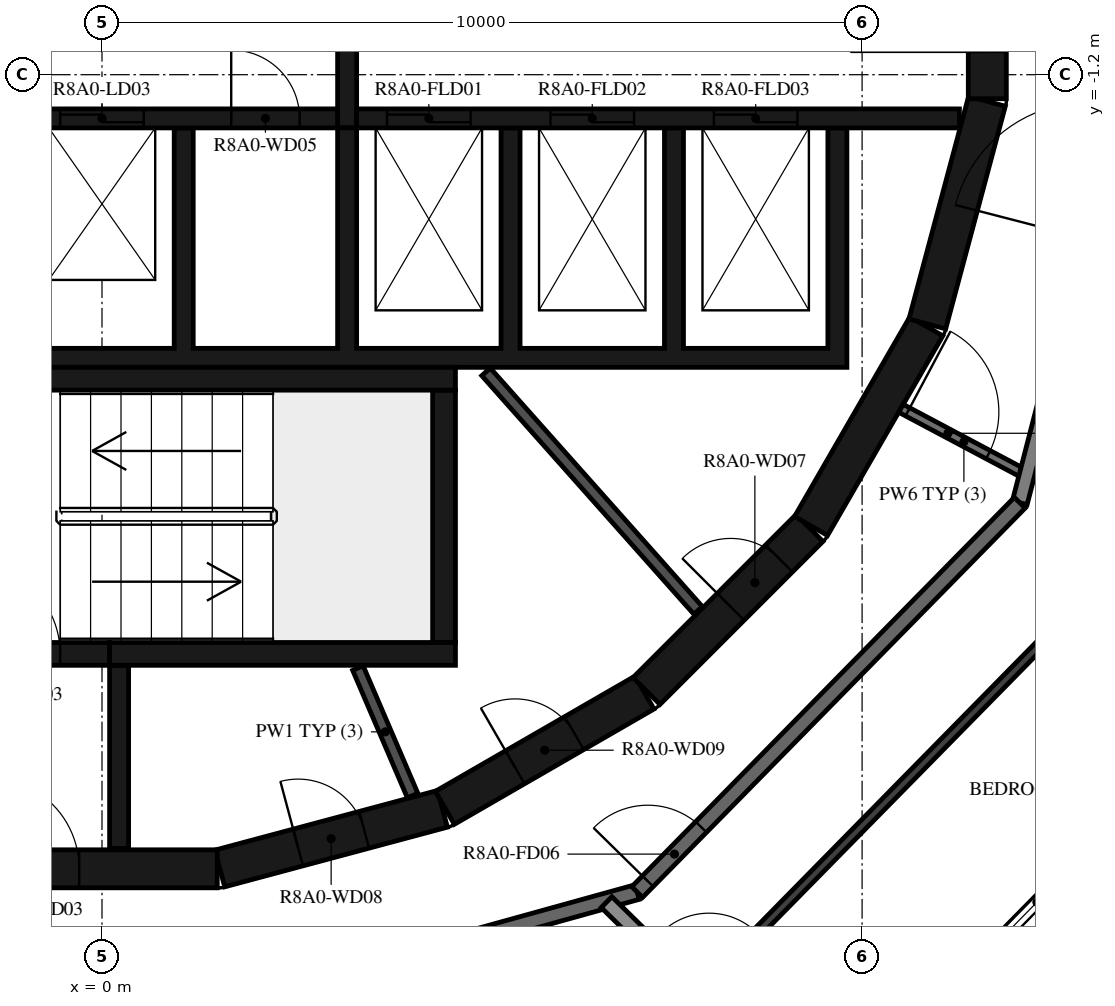
"""IFC4 building model, lengths in metres.
Left out: names, types, materials, properties, quantities, classifications, styles, units other than length and angle.
Written with IfcOpenShell. Run it as: python <this file> out.ifc"""

import sys

from ifc_helpers import new_model, si_unit, direction, frame, frame_2d, origin, place, context, subcontext, project, spatial, polyline, rectangle, outline, extrude, element, fill, save


model = new_model("IFC4")
c1 = context("Model", 3, precision=1e-05, world=origin(), true_north=direction((0.0, 1.0)))
c2 = subcontext(c1, "Body", "Model", "MODEL_VIEW")
j1 = project(units=[si_unit("LENGTHUNIT", "METRE"), si_unit("PLANEANGLEUNIT", "RADIAN")], contexts=[c1])
p1 = place(None, origin())
s1 = spatial("IfcSite", under=j1, at=p1, CompositionType="ELEMENT")
p2 = place(p1, origin())
s2 = spatial("IfcBuilding", under=s1, at=p2, CompositionType="ELEMENT")
p3 = place(p2, frame((0.0, 0.0, 305.2)))
s3 = spatial("IfcBuildingStorey", under=s2, at=p3, CompositionType="ELEMENT", Elevation=305.2)
p4 = place(p3, frame((1.55, -11.643, 0.0), z_axis=(0.0, 0.0, 1.0), x_axis=(0.965948410781, 0.258734743916, 0.0)))
e1 = element("IfcWall", 1, at=p4, inside=s3, PredefinedType="SHEAR", context=c2, shape_type="SweptSolid", body=[
    extrude(rectangle(XDim=3.033, YDim=0.5, at=frame_2d((1.516, 0.0))), origin(), (0.0, 0.0, 1.0), 3.12),
])
p5 = place(p4, frame((1.066, 0.0, 0.0)))
e2 = element("IfcOpeningElement", 2, at=p5, cuts=e1, PredefinedType="OPENING", context=c2, shape_type="SweptSolid", body=[
    extrude(rectangle(XDim=0.9, YDim=2.1, at=frame_2d((0.45, 1.05))), frame((0.0, 0.26, 0.0), z_axis=(0.0, -1.0, 0.0), x_axis=(1.0, 0.0, 0.0)), (0.0, 0.0, 1.0), 0.52),
])
p6 = place(p3, frame((4.51, -10.845, 0.0), z_axis=(0.0, 0.0, 1.0), x_axis=(0.865975092491, 0.500087131594, 0.0)))
e3 = element("IfcWall", 3, at=p6, inside=s3, PredefinedType="SHEAR", context=c2, shape_type="SweptSolid", body=[
    extrude(rectangle(XDim=3.033, YDim=0.5, at=frame_2d((1.516, 0.0))), origin(), (0.0, 0.0, 1.0), 3.12),
])
p7 = place(p6, frame((1.066, 0.0, 0.0)))
e4 = element("IfcOpeningElement", 4, at=p7, cuts=e3, PredefinedType="OPENING", context=c2, shape_type="SweptSolid", body=[
    extrude(rectangle(XDim=0.9, YDim=2.1, at=frame_2d((0.45, 1.05))), frame((0.0, 0.26, 0.0), z_axis=(0.0, -1.0, 0.0), x_axis=(1.0, 0.0, 0.0)), (0.0, 0.0, 1.0), 0.52),
])
p8 = place(p3, frame((7.164, -9.308, 0.0), z_axis=(0.0, 0.0, 1.0), x_axis=(0.707106781187, 0.707106781187, 0.0)))
e5 = element("IfcWall", 5, at=p8, inside=s3, PredefinedType="SHEAR", context=c2, shape_type="SweptSolid", body=[
    extrude(rectangle(XDim=3.032, YDim=0.5, at=frame_2d((1.516, 0.0))), origin(), (0.0, 0.0, 1.0), 3.12),
])
p9 = place(p8, frame((1.566, 0.0, 0.0)))
e6 = element("IfcOpeningElement", 6, at=p9, cuts=e5, PredefinedType="OPENING", context=c2, shape_type="SweptSolid", body=[
    extrude(rectangle(XDim=0.9, YDim=2.1, at=frame_2d((0.45, 1.05))), frame((0.0, 0.26, 0.0), z_axis=(0.0, -1.0, 0.0), x_axis=(1.0, 0.0, 0.0)), (0.0, 0.0, 1.0), 0.52),
])
for number, where, z_axis, x_axis in (
    (7, (9.329, -7.137, 0.0), (0.0, 0.0, 1.0), (0.5, 0.866, 0.0)),
    (8, (10.858, -4.479, 0.0), (0.0, 0.0, 1.0), (0.259, 0.966, 0.0)),
):
    element("IfcWall", number, at=place(p3, frame(where, z_axis=z_axis, x_axis=x_axis)), inside=s3, PredefinedType="SHEAR", context=c2, shape_type="SweptSolid", body=[
        extrude(rectangle(XDim=3.033, YDim=0.5, at=frame_2d((1.516, 0.0))), origin(), (0.0, 0.0, 1.0), 3.12),
    ])
p10 = place(p3, frame((11.647, -1.516, 0.0), z_axis=(0.0, 0.0, 1.0), x_axis=(0.0, 1.0, 0.0)))
e9 = element("IfcWall", 9, at=p10, inside=s3, PredefinedType="SHEAR", context=c2, shape_type="SweptSolid", body=[
    extrude(rectangle(XDim=3.033, YDim=0.5, at=frame_2d((1.516, 0.0))), origin(), (0.0, 0.0, 1.0), 3.12),
])
p11 = place(p10, frame((0.616, 0.0, 0.0)))
e10 = element("IfcOpeningElement", 10, at=p11, cuts=e9, PredefinedType="OPENING", context=c2, shape_type="SweptSolid", body=[
    extrude(rectangle(XDim=1.8, YDim=2.1, at=frame_2d((0.9, 1.05))), frame((0.0, 0.26, 0.0), z_axis=(0.0, -1.0, 0.0), x_axis=(1.0, 0.0, 0.0)), (0.0, 0.0, 1.0), 0.52),
])
p12 = place(p3, frame((-1.516, -11.647, 0.0), z_axis=(0.0, 0.0, 1.0), x_axis=(1.0, 0.0, 0.0)))
e11 = element("IfcWall", 11, at=p12, inside=s3, PredefinedType="SHEAR", context=c2, shape_type="SweptSolid", body=[
    extrude(rectangle(XDim=3.033, YDim=0.5, at=frame_2d((1.516, 0.0))), origin(), (0.0, 0.0, 1.0), 3.12),
])
p13 = place(p12, frame((0.016, 0.0, 0.0)))
e12 = element("IfcOpeningElement", 12, at=p13, cuts=e11, PredefinedType="OPENING", context=c2, shape_type="SweptSolid", body=[
    extrude(rectangle(XDim=1.2, YDim=2.1, at=frame_2d((0.6, 1.05))), frame((0.0, 0.26, 0.0), z_axis=(0.0, -1.0, 0.0), x_axis=(1.0, 0.0, 0.0)), (0.0, 0.0, 1.0), 0.52),
])
p14 = place(p3, frame((-2.4, -5.2, 0.0), z_axis=(0.0, 0.0, 1.0), x_axis=(1.0, 0.0, 0.0)))
e13 = element("IfcWall", 13, at=p14, inside=s3, PredefinedType="SHEAR", context=c2, shape_type="SweptSolid", body=[
    extrude(rectangle(XDim=7.05, YDim=0.3, at=frame_2d((3.525, 0.0))), origin(), (0.0, 0.0, 1.0), 3.12),
])
p15 = place(p3, frame((4.5, -8.67, 0.0), z_axis=(0.0, 0.0, 1.0), x_axis=(0.0, 1.0, 0.0)))
e14 = element("IfcWall", 14, at=p15, inside=s3, PredefinedType="SHEAR", context=c2, shape_type="SweptSolid", body=[
    extrude(rectangle(XDim=3.32, YDim=0.3, at=frame_2d((1.66, 0.0))), origin(), (0.0, 0.0, 1.0), 3.12),
])
p16 = place(p3, frame((0.1, -8.82, 0.0), z_axis=(0.0, 0.0, 1.0), x_axis=(1.0, 0.0, 0.0)))
e15 = element("IfcWall", 15, at=p16, inside=s3, PredefinedType="SHEAR", context=c2, shape_type="SweptSolid", body=[
    extrude(rectangle(XDim=4.55, YDim=0.3, at=frame_2d((2.275, 0.0))), origin(), (0.0, 0.0, 1.0), 3.12),
])
p17 = place(p3, frame((-2.4, -8.82, 0.0), z_axis=(0.0, 0.0, 1.0), x_axis=(1.0, 0.0, 0.0)))
e16 = element("IfcWall", 16, at=p17, inside=s3, PredefinedType="SHEAR", context=c2, shape_type="SweptSolid", body=[
    extrude(rectangle(XDim=2.5, YDim=0.3, at=frame_2d((1.25, 0.0))), origin(), (0.0, 0.0, 1.0), 3.12),
])
p18 = place(p17, frame((0.65, 0.0, 0.0)))
e17 = element("IfcOpeningElement", 17, at=p18, cuts=e16, PredefinedType="OPENING", context=c2, shape_type="SweptSolid", body=[
    extrude(rectangle(XDim=1.2, YDim=2.1, at=frame_2d((0.6, 1.05))), frame((0.0, 0.16, 0.0), z_axis=(0.0, -1.0, 0.0), x_axis=(1.0, 0.0, 0.0)), (0.0, 0.0, 1.0), 0.32),
])
p19 = place(p3, frame((0.225, -8.97, 0.0), z_axis=(0.0, 0.0, 1.0), x_axis=(0.0, -1.0, 0.0)))
e18 = element("IfcWall", 18, at=p19, inside=s3, PredefinedType="SHEAR", context=c2, shape_type="SweptSolid", body=[
    extrude(rectangle(XDim=2.41, YDim=0.25, at=frame_2d((1.205, 0.0))), origin(), (0.0, 0.0, 1.0), 3.12),
])
p20 = place(p3, origin())
e19 = element("IfcWall", 19, at=p20, inside=s3, PredefinedType="SHEAR", context=c2, shape_type="SweptSolid", body=[
    extrude(outline(polyline([(9.8, -5.05), (9.8, -4.8), (9.8, -1.9), (9.55, -1.9), (9.55, -4.8), (7.65, -4.8), (7.65, -1.9), (7.4, -1.9), (7.4, -4.8), (5.5, -4.8), (5.5, -1.9), (5.25, -1.9), (5.25, -4.8), (3.35, -4.8), (3.35, -1.9), (3.1, -1.9), (3.1, -4.8), (1.2, -4.8), (1.2, -1.9), (0.95, -1.9), (0.95, -4.8), (-0.95, -4.8), (-0.95, -1.9), (-1.2, -1.9), (-1.2, -4.8), (-3.1, -4.8), (-3.1, -1.9), (-3.35, -1.9), (-3.35, -4.8), (-5.25, -4.8), (-5.25, -1.9), (-5.5, -1.9), (-5.5, -4.8), (-9.55, -4.8), (-9.55, -1.9), (-9.8, -1.9), (-9.8, -4.8), (-9.8, -5.05), (9.8, -5.05)])), origin(), (0.0, 0.0, 1.0), 3.12),
])
p21 = place(p3, frame((-11.28, -1.775, 0.0), z_axis=(0.0, 0.0, 1.0), x_axis=(1.0, 0.0, 0.0)))
e20 = element("IfcWall", 20, at=p21, inside=s3, PredefinedType="SHEAR", context=c2, shape_type="SweptSolid", body=[
    extrude(rectangle(XDim=14.38, YDim=0.25, at=frame_2d((7.19, 0.0))), origin(), (0.0, 0.0, 1.0), 3.12),
])
p22 = place(p21, frame((6.43, 0.0, 0.0)))
e21 = element("IfcOpeningElement", 21, at=p22, cuts=e20, PredefinedType="OPENING", context=c2, shape_type="SweptSolid", body=[
    extrude(rectangle(XDim=1.1, YDim=2.1, at=frame_2d((0.55, 1.05))), frame((0.0, 0.135, 0.0), z_axis=(0.0, -1.0, 0.0), x_axis=(1.0, 0.0, 0.0)), (0.0, 0.0, 1.0), 0.27),
])
p23 = place(p21, frame((8.58, 0.0, 0.0)))
e22 = element("IfcOpeningElement", 22, at=p23, cuts=e20, PredefinedType="OPENING", context=c2, shape_type="SweptSolid", body=[
    extrude(rectangle(XDim=1.1, YDim=2.1, at=frame_2d((0.55, 1.05))), frame((0.0, 0.135, 0.0), z_axis=(0.0, -1.0, 0.0), x_axis=(1.0, 0.0, 0.0)), (0.0, 0.0, 1.0), 0.27),
])
p24 = place(p21, frame((10.73, 0.0, 0.0)))
e23 = element("IfcOpeningElement", 23, at=p24, cuts=e20, PredefinedType="OPENING", context=c2, shape_type="SweptSolid", body=[
    extrude(rectangle(XDim=1.1, YDim=2.1, at=frame_2d((0.55, 1.05))), frame((0.0, 0.135, 0.0), z_axis=(0.0, -1.0, 0.0), x_axis=(1.0, 0.0, 0.0)), (0.0, 0.0, 1.0), 0.27),
])
p25 = place(p21, frame((3.305, 0.0, 0.0)))
e24 = element("IfcOpeningElement", 24, at=p25, cuts=e20, PredefinedType="OPENING", context=c2, shape_type="SweptSolid", body=[
    extrude(rectangle(XDim=0.9, YDim=2.1, at=frame_2d((0.45, 1.05))), frame((0.0, 0.135, 0.0), z_axis=(0.0, -1.0, 0.0), x_axis=(1.0, 0.0, 0.0)), (0.0, 0.0, 1.0), 0.27),
])
p26 = place(p21, frame((12.98, 0.0, 0.0)))
e25 = element("IfcOpeningElement", 25, at=p26, cuts=e20, PredefinedType="OPENING", context=c2, shape_type="SweptSolid", body=[
    extrude(rectangle(XDim=0.9, YDim=2.1, at=frame_2d((0.45, 1.05))), frame((0.0, 0.135, 0.0), z_axis=(0.0, -1.0, 0.0), x_axis=(1.0, 0.0, 0.0)), (0.0, 0.0, 1.0), 0.27),
])
p27 = place(p3, frame((3.35, -1.775, 0.0), z_axis=(0.0, 0.0, 1.0), x_axis=(1.0, 0.0, 0.0)))
e26 = element("IfcWall", 26, at=p27, inside=s3, PredefinedType="SHEAR", context=c2, shape_type="SweptSolid", body=[
    extrude(rectangle(XDim=7.93, YDim=0.25, at=frame_2d((3.965, 0.0))), origin(), (0.0, 0.0, 1.0), 3.12),
])
p28 = place(p27, frame((0.4, 0.0, 0.0)))
e27 = element("IfcOpeningElement", 27, at=p28, cuts=e26, PredefinedType="OPENING", context=c2, shape_type="SweptSolid", body=[
    extrude(rectangle(XDim=1.1, YDim=2.4, at=frame_2d((0.55, 1.2))), frame((0.0, 0.135, 0.0), z_axis=(0.0, -1.0, 0.0), x_axis=(1.0, 0.0, 0.0)), (0.0, 0.0, 1.0), 0.27),
])
p29 = place(p27, frame((2.55, 0.0, 0.0)))
e28 = element("IfcOpeningElement", 28, at=p29, cuts=e26, PredefinedType="OPENING", context=c2, shape_type="SweptSolid", body=[
    extrude(rectangle(XDim=1.1, YDim=2.4, at=frame_2d((0.55, 1.2))), frame((0.0, 0.135, 0.0), z_axis=(0.0, -1.0, 0.0), x_axis=(1.0, 0.0, 0.0)), (0.0, 0.0, 1.0), 0.27),
])
p30 = place(p27, frame((4.7, 0.0, 0.0)))
e29 = element("IfcOpeningElement", 29, at=p30, cuts=e26, PredefinedType="OPENING", context=c2, shape_type="SweptSolid", body=[
    extrude(rectangle(XDim=1.1, YDim=2.4, at=frame_2d((0.55, 1.2))), frame((0.0, 0.135, 0.0), z_axis=(0.0, -1.0, 0.0), x_axis=(1.0, 0.0, 0.0)), (0.0, 0.0, 1.0), 0.27),
])
p31 = place(p3, frame((3.225, -1.9, 0.0), z_axis=(0.0, 0.0, 1.0), x_axis=(0.0, 1.0, 0.0)))
e30 = element("IfcWall", 30, at=p31, inside=s3, PredefinedType="SHEAR", context=c2, shape_type="SweptSolid", body=[
    extrude(rectangle(XDim=3.8, YDim=0.25, at=frame_2d((1.9, 0.0))), origin(), (0.0, 0.0, 1.0), 3.12),
])
p32 = place(p3, frame((7.842, -8.248, 0.0), z_axis=(0.0, 0.0, 1.0), x_axis=(-0.66446128181, 0.747322691329, 0.0)))
e31 = element("IfcWall", 31, at=p32, inside=s3, PredefinedType="PARTITIONING", context=c2, shape_type="SweptSolid", body=[
    extrude(rectangle(XDim=4.198, YDim=0.15, at=frame_2d((2.099, 0.0))), origin(), (0.0, 0.0, 1.0), 3.12),
])
p33 = place(p3, frame((3.367, -9.007, 0.0), z_axis=(0.0, 0.0, 1.0), x_axis=(0.394387482265, -0.918944238696, 0.0)))
e32 = element("IfcWall", 32, at=p33, inside=s3, PredefinedType="PARTITIONING", context=c2, shape_type="SweptSolid", body=[
    extrude(rectangle(XDim=1.825, YDim=0.15, at=frame_2d((0.913, 0.0))), origin(), (0.0, 0.0, 1.0), 3.12),
])
p34 = place(p3, frame((10.511, -5.589, 0.0), z_axis=(0.0, 0.0, 1.0), x_axis=(0.882957311919, -0.469453283437, 0.0)))
e33 = element("IfcWall", 33, at=p34, inside=s3, PredefinedType="PARTITIONING", context=c2, shape_type="SweptSolid", body=[
    extrude(rectangle(XDim=1.876, YDim=0.12, at=frame_2d((0.938, 0.0))), origin(), (0.0, 0.0, 1.0), 3.12),
])
p35 = place(p34, frame((0.1, 0.0, 0.0)))
e34 = element("IfcOpeningElement", 34, at=p35, cuts=e33, PredefinedType="OPENING", context=c2, shape_type="SweptSolid", body=[
    extrude(rectangle(XDim=1.2, YDim=2.1, at=frame_2d((0.6, 1.05))), frame((0.0, 0.07, 0.0), z_axis=(0.0, -1.0, 0.0), x_axis=(1.0, 0.0, 0.0)), (0.0, 0.0, 1.0), 0.14),
])
p36 = place(p3, frame((12.074, -6.831, 0.0), z_axis=(0.0, 0.0, 1.0), x_axis=(0.250391063186, 0.968144780225, 0.0)))
e35 = element("IfcWall", 35, at=p36, inside=s3, PredefinedType="STANDARD", context=c2, shape_type="SweptSolid", body=[
    extrude(rectangle(XDim=7.181, YDim=0.2, at=frame_2d((3.591, 0.0))), origin(), (0.0, 0.0, 1.0), 3.12),
])
p37 = place(p36, frame((3.581, 0.0, 0.0)))
e36 = element("IfcOpeningElement", 36, at=p37, cuts=e35, PredefinedType="OPENING", context=c2, shape_type="SweptSolid", body=[
    extrude(rectangle(XDim=1.8, YDim=2.1, at=frame_2d((0.9, 1.05))), frame((0.0, 0.11, 0.0), z_axis=(0.0, -1.0, 0.0), x_axis=(1.0, 0.0, 0.0)), (0.0, 0.0, 1.0), 0.22),
])
p38 = place(p3, frame((-6.831, -12.074, 0.0), z_axis=(0.0, 0.0, 1.0), x_axis=(0.968144780225, -0.250391063186, 0.0)))
e37 = element("IfcWall", 37, at=p38, inside=s3, PredefinedType="STANDARD", context=c2, shape_type="SweptSolid", body=[
    extrude(rectangle(XDim=7.181, YDim=0.2, at=frame_2d((3.591, 0.0))), origin(), (0.0, 0.0, 1.0), 3.12),
])
p39 = place(p38, frame((2.39, 0.0, 0.0)))
e38 = element("IfcOpeningElement", 38, at=p39, cuts=e37, PredefinedType="OPENING", context=c2, shape_type="SweptSolid", body=[
    extrude(rectangle(XDim=1.0, YDim=2.1, at=frame_2d((0.5, 1.05))), frame((0.0, 0.11, 0.0), z_axis=(0.0, -1.0, 0.0), x_axis=(1.0, 0.0, 0.0)), (0.0, 0.0, 1.0), 0.22),
])
p40 = place(p38, frame((5.69, 0.0, 0.0)))
e39 = element("IfcOpeningElement", 39, at=p40, cuts=e37, PredefinedType="OPENING", context=c2, shape_type="SweptSolid", body=[
    extrude(rectangle(XDim=1.0, YDim=2.1, at=frame_2d((0.5, 1.05))), frame((0.0, 0.11, 0.0), z_axis=(0.0, -1.0, 0.0), x_axis=(1.0, 0.0, 0.0)), (0.0, 0.0, 1.0), 0.22),
])
p41 = place(p3, frame((0.121, -13.872, 0.0), z_axis=(0.0, 0.0, 1.0), x_axis=(0.963625960674, 0.267254575108, 0.0)))
e40 = element("IfcWall", 40, at=p41, inside=s3, PredefinedType="STANDARD", context=c2, shape_type="SweptSolid", body=[
    extrude(rectangle(XDim=7.181, YDim=0.2, at=frame_2d((3.591, 0.0))), origin(), (0.0, 0.0, 1.0), 3.12),
])
p42 = place(p3, frame((7.041, -11.953, 0.0), z_axis=(0.0, 0.0, 1.0), x_axis=(0.70090916255, 0.713250549143, 0.0)))
e41 = element("IfcWall", 41, at=p42, inside=s3, PredefinedType="STANDARD", context=c2, shape_type="SweptSolid", body=[
    extrude(rectangle(XDim=7.181, YDim=0.2, at=frame_2d((3.59, 0.0))), origin(), (0.0, 0.0, 1.0), 3.12),
])
p43 = place(p42, frame((0.2, 0.0, 0.0)))
e42 = element("IfcOpeningElement", 42, at=p43, cuts=e41, PredefinedType="OPENING", context=c2, shape_type="SweptSolid", body=[
    extrude(rectangle(XDim=1.0, YDim=2.1, at=frame_2d((0.5, 1.05))), frame((0.0, 0.11, 0.0), z_axis=(0.0, -1.0, 0.0), x_axis=(1.0, 0.0, 0.0)), (0.0, 0.0, 1.0), 0.22),
])
p44 = place(p3, frame((9.462, -14.861, 0.0), z_axis=(0.0, 0.0, 1.0), x_axis=(-0.713276937124, 0.700882308927, 0.0)))
e43 = element("IfcWall", 43, at=p44, inside=s3, PredefinedType="STANDARD", context=c2, shape_type="SweptSolid", body=[
    extrude(rectangle(XDim=3.959, YDim=0.2, at=frame_2d((1.979, 0.0))), origin(), (0.0, 0.0, 1.0), 2.73),
])
p45 = place(p3, frame((7.846, -13.273, 0.0), z_axis=(0.0, 0.0, 1.0), x_axis=(0.700911018066, 0.713248725728, 0.0)))
e44 = element("IfcWall", 44, at=p45, inside=s3, PredefinedType="PARTITIONING", context=c2, shape_type="SweptSolid", body=[
    extrude(rectangle(XDim=7.935, YDim=0.12, at=frame_2d((3.968, 0.0))), origin(), (0.0, 0.0, 1.0), 3.12),
])
p46 = place(p45, frame((0.2, 0.0, 0.0)))
e45 = element("IfcOpeningElement", 45, at=p46, cuts=e44, PredefinedType="OPENING", context=c2, shape_type="SweptSolid", body=[
    extrude(rectangle(XDim=0.9, YDim=2.1, at=frame_2d((0.45, 1.05))), frame((0.0, 0.07, 0.0), z_axis=(0.0, -1.0, 0.0), x_axis=(1.0, 0.0, 0.0)), (0.0, 0.0, 1.0), 0.14),
])
p47 = place(p18, origin())
e46 = element("IfcDoor", 46, at=p47, inside=s3, OperationType="SINGLE_SWING_LEFT", PredefinedType="DOOR", context=c2, shape_type="SweptSolid", body=[
    extrude(rectangle(XDim=1.2, YDim=2.1, at=frame_2d((0.6, 1.05))), frame((0.0, 0.025, 0.0), z_axis=(0.0, -1.0, 0.0), x_axis=(1.0, 0.0, 0.0)), (0.0, 0.0, 1.0), 0.05),
])
fill(e17, e46)
p48 = place(p13, origin())
e47 = element("IfcDoor", 47, at=p48, inside=s3, OperationType="SINGLE_SWING_RIGHT", PredefinedType="DOOR", context=c2, shape_type="SweptSolid", body=[
    extrude(rectangle(XDim=1.2, YDim=2.1, at=frame_2d((0.6, 1.05))), frame((0.0, 0.025, 0.0), z_axis=(0.0, -1.0, 0.0), x_axis=(1.0, 0.0, 0.0)), (0.0, 0.0, 1.0), 0.05),
])
fill(e12, e47)
p49 = place(p11, origin())
e48 = element("IfcDoor", 48, at=p49, inside=s3, OperationType="DOUBLE_DOOR_SINGLE_SWING", PredefinedType="DOOR", context=c2, shape_type="SweptSolid", body=[
    extrude(rectangle(XDim=1.8, YDim=2.1, at=frame_2d((0.9, 1.05))), frame((0.0, 0.025, 0.0), z_axis=(0.0, -1.0, 0.0), x_axis=(1.0, 0.0, 0.0)), (0.0, 0.0, 1.0), 0.05),
])
fill(e10, e48)
p50 = place(p24, origin())
e49 = element("IfcDoor", 49, at=p50, inside=s3, OperationType="DOUBLE_DOOR_SLIDING", PredefinedType="DOOR", context=c2, shape_type="SweptSolid", body=[
    extrude(rectangle(XDim=1.1, YDim=2.1, at=frame_2d((0.55, 1.05))), frame((0.0, 0.025, 0.0), z_axis=(0.0, -1.0, 0.0), x_axis=(1.0, 0.0, 0.0)), (0.0, 0.0, 1.0), 0.05),
])
fill(e23, e49)
p51 = place(p28, origin())
e50 = element("IfcDoor", 50, at=p51, inside=s3, OperationType="DOUBLE_DOOR_SLIDING", PredefinedType="DOOR", context=c2, shape_type="SweptSolid", body=[
    extrude(rectangle(XDim=1.1, YDim=2.4, at=frame_2d((0.55, 1.2))), frame((0.0, 0.025, 0.0), z_axis=(0.0, -1.0, 0.0), x_axis=(1.0, 0.0, 0.0)), (0.0, 0.0, 1.0), 0.05),
])
fill(e27, e50)
p52 = place(p29, origin())
e51 = element("IfcDoor", 51, at=p52, inside=s3, OperationType="DOUBLE_DOOR_SLIDING", PredefinedType="DOOR", context=c2, shape_type="SweptSolid", body=[
    extrude(rectangle(XDim=1.1, YDim=2.4, at=frame_2d((0.55, 1.2))), frame((0.0, 0.025, 0.0), z_axis=(0.0, -1.0, 0.0), x_axis=(1.0, 0.0, 0.0)), (0.0, 0.0, 1.0), 0.05),
])
fill(e28, e51)
p53 = place(p30, origin())
e52 = element("IfcDoor", 52, at=p53, inside=s3, OperationType="DOUBLE_DOOR_SLIDING", PredefinedType="DOOR", context=c2, shape_type="SweptSolid", body=[
    extrude(rectangle(XDim=1.1, YDim=2.4, at=frame_2d((0.55, 1.2))), frame((0.0, 0.025, 0.0), z_axis=(0.0, -1.0, 0.0), x_axis=(1.0, 0.0, 0.0)), (0.0, 0.0, 1.0), 0.05),
])
fill(e29, e52)
p54 = place(p26, origin())
e53 = element("IfcDoor", 53, at=p54, inside=s3, OperationType="SINGLE_SWING_LEFT", PredefinedType="DOOR", context=c2, shape_type="SweptSolid", body=[
    extrude(rectangle(XDim=0.9, YDim=2.1, at=frame_2d((0.45, 1.05))), frame((0.0, 0.025, 0.0), z_axis=(0.0, -1.0, 0.0), x_axis=(1.0, 0.0, 0.0)), (0.0, 0.0, 1.0), 0.05),
])
fill(e25, e53)
p55 = place(p9, origin())
e54 = element("IfcDoor", 54, at=p55, inside=s3, OperationType="SINGLE_SWING_LEFT", PredefinedType="DOOR", context=c2, shape_type="SweptSolid", body=[
    extrude(rectangle(XDim=0.9, YDim=2.1, at=frame_2d((0.45, 1.05))), frame((0.0, 0.025, 0.0), z_axis=(0.0, -1.0, 0.0), x_axis=(1.0, 0.0, 0.0)), (0.0, 0.0, 1.0), 0.05),
])
fill(e6, e54)
p56 = place(p5, origin())
e55 = element("IfcDoor", 55, at=p56, inside=s3, OperationType="SINGLE_SWING_RIGHT", PredefinedType="DOOR", context=c2, shape_type="SweptSolid", body=[
    extrude(rectangle(XDim=0.9, YDim=2.1, at=frame_2d((0.45, 1.05))), frame((0.0, 0.025, 0.0), z_axis=(0.0, -1.0, 0.0), x_axis=(1.0, 0.0, 0.0)), (0.0, 0.0, 1.0), 0.05),
])
fill(e2, e55)
p57 = place(p7, origin())
e56 = element("IfcDoor", 56, at=p57, inside=s3, OperationType="SINGLE_SWING_LEFT", PredefinedType="DOOR", context=c2, shape_type="SweptSolid", body=[
    extrude(rectangle(XDim=0.9, YDim=2.1, at=frame_2d((0.45, 1.05))), frame((0.0, 0.025, 0.0), z_axis=(0.0, -1.0, 0.0), x_axis=(1.0, 0.0, 0.0)), (0.0, 0.0, 1.0), 0.05),
])
fill(e4, e56)
p58 = place(p43, origin())
e57 = element("IfcDoor", 57, at=p58, inside=s3, OperationType="SINGLE_SWING_LEFT", PredefinedType="DOOR", context=c2, shape_type="SweptSolid", body=[
    extrude(rectangle(XDim=1.0, YDim=2.1, at=frame_2d((0.5, 1.05))), frame((0.0, 0.025, 0.0), z_axis=(0.0, -1.0, 0.0), x_axis=(1.0, 0.0, 0.0)), (0.0, 0.0, 1.0), 0.05),
])
fill(e42, e57)
p59 = place(p35, origin())
e58 = element("IfcDoor", 58, at=p59, inside=s3, OperationType="DOUBLE_DOOR_SINGLE_SWING", PredefinedType="DOOR", context=c2, shape_type="SweptSolid", body=[
    extrude(rectangle(XDim=1.2, YDim=2.1, at=frame_2d((0.6, 1.05))), frame((0.0, 0.025, 0.0), z_axis=(0.0, -1.0, 0.0), x_axis=(1.0, 0.0, 0.0)), (0.0, 0.0, 1.0), 0.05),
])
fill(e34, e58)
save(model, sys.argv[1])
